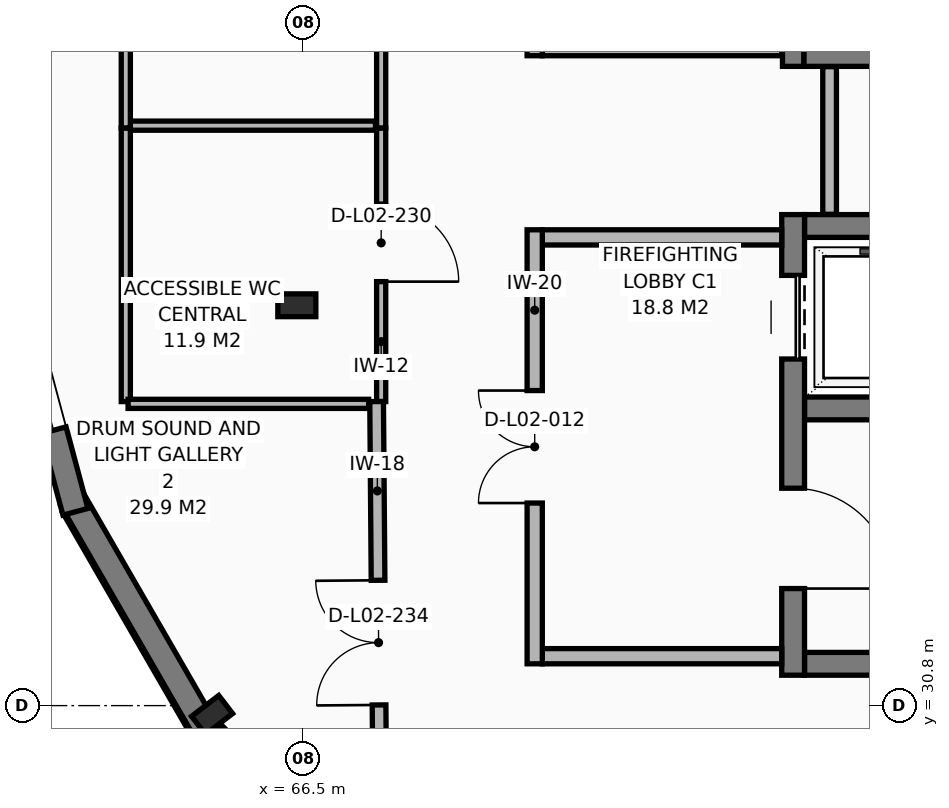
"""IFC4 building model, lengths in metres.
Left out: names, types, materials, properties, quantities, classifications, styles, units other than length and angle.
Written with IfcOpenShell. Run it as: python <this file> out.ifc"""

import sys

from ifc_helpers import new_model, si_unit, direction, frame, frame_2d, origin, origin_2d, place, context, subcontext, project, spatial, rectangle, i_section, extrude, element, fill, save


model = new_model("IFC4")
c1 = context("Model", 3, precision=1e-05, world=origin(), true_north=direction((0.0, 1.0)))
c2 = subcontext(c1, "Body", "Model", "MODEL_VIEW")
j1 = project(units=[si_unit("LENGTHUNIT", "METRE"), si_unit("PLANEANGLEUNIT", "RADIAN")], contexts=[c1])
p1 = place(None, origin())
s1 = spatial("IfcSite", under=j1, at=p1, CompositionType="ELEMENT")
p2 = place(p1, origin())
s2 = spatial("IfcBuilding", under=s1, at=p2, CompositionType="ELEMENT")
p3 = place(p2, frame((0.0, 0.0, 9.52)))
s3 = spatial("IfcBuildingStorey", under=s2, at=p3, CompositionType="ELEMENT", Elevation=9.52)
p4 = place(p3, frame((65.305, 30.677, 0.0), z_axis=(0.0, 0.0, 1.0), x_axis=(-0.793353340291, -0.608761429009, 0.0)))
e1 = element("IfcColumn", 1, at=p4, inside=s3, PredefinedType="COLUMN", context=c2, shape_type="SweptSolid", body=[
    extrude(i_section(OverallWidth=0.3, OverallDepth=0.45, WebThickness=0.014, FlangeThickness=0.026, FilletRadius=0.027, at=origin_2d()), origin(), (0.0, 0.0, 1.0), 4.16),
])
p5 = place(p3, frame((66.42, 36.067, 0.0), z_axis=(0.0, 0.0, 1.0), x_axis=(1.0, 0.0, 0.0)))
e2 = element("IfcColumn", 2, at=p5, inside=s3, PredefinedType="COLUMN", context=c2, shape_type="SweptSolid", body=[
    extrude(i_section(OverallWidth=0.3, OverallDepth=0.5, WebThickness=0.014, FlangeThickness=0.028, FilletRadius=0.027, at=origin_2d()), origin(), (0.0, 0.0, 1.0), 4.16),
])
p6 = place(p3, frame((67.689, 28.043, 0.0), z_axis=(0.0, 0.0, 1.0), x_axis=(-0.707106781187, 0.707106781187, 0.0)))
e3 = element("IfcWall", 3, at=p6, inside=s3, PredefinedType="SOLIDWALL", context=c2, shape_type="SweptSolid", body=[
    extrude(rectangle(XDim=3.571, YDim=0.34, at=frame_2d((1.786, 0.0))), origin(), (0.0, 0.0, 1.0), 3.96),
])
p7 = place(p6, frame((1.111, 0.0, 0.85)))
e4 = element("IfcOpeningElement", 4, at=p7, cuts=e3, PredefinedType="OPENING", context=c2, shape_type="SweptSolid", body=[
    extrude(rectangle(XDim=1.35, YDim=1.5, at=frame_2d((0.675, 0.75))), frame((0.0, 0.18, 0.0), z_axis=(0.0, -1.0, 0.0), x_axis=(1.0, 0.0, 0.0)), (0.0, 0.0, 1.0), 0.36),
])
p8 = place(p3, frame((65.249, 30.421, 0.0), z_axis=(0.0, 0.0, 1.0), x_axis=(-0.500006500783, 0.866021650523, 0.0)))
e5 = element("IfcWall", 5, at=p8, inside=s3, PredefinedType="SOLIDWALL", context=c2, shape_type="SweptSolid", body=[
    extrude(rectangle(XDim=3.571, YDim=0.34, at=frame_2d((1.786, 0.0))), origin(), (0.0, 0.0, 1.0), 3.96),
])
p9 = place(p3, frame((63.507, 33.35, 0.0), z_axis=(0.0, 0.0, 1.0), x_axis=(-0.258764562387, 0.965940423242, 0.0)))
e6 = element("IfcWall", 6, at=p9, inside=s3, PredefinedType="SOLIDWALL", context=c2, shape_type="SweptSolid", body=[
    extrude(rectangle(XDim=3.571, YDim=0.34, at=frame_2d((1.786, 0.0))), origin(), (0.0, 0.0, 1.0), 3.96),
])
p10 = place(p9, frame((1.111, 0.0, 0.85)))
e7 = element("IfcOpeningElement", 7, at=p10, cuts=e6, PredefinedType="OPENING", context=c2, shape_type="SweptSolid", body=[
    extrude(rectangle(XDim=1.35, YDim=1.5, at=frame_2d((0.675, 0.75))), frame((0.0, 0.18, 0.0), z_axis=(0.0, -1.0, 0.0), x_axis=(1.0, 0.0, 0.0)), (0.0, 0.0, 1.0), 0.36),
])
for number, where, z_axis, x_axis in (
    (8, (73.1, 31.35, 0.0), (0.0, 0.0, 1.0), (1.0, 0.0, 0.0)),
    (9, (80.8, 34.71, 0.0), (0.0, 0.0, 1.0), (-1.0, 0.0, 0.0)),
):
    element("IfcWall", number, at=place(p3, frame(where, z_axis=z_axis, x_axis=x_axis)), inside=s3, PredefinedType="SHEAR", context=c2, shape_type="SweptSolid", body=[
        extrude(rectangle(XDim=7.7, YDim=0.3, at=frame_2d((3.85, 0.0))), origin(), (0.0, 0.0, 1.0), 3.96),
    ])
p11 = place(p3, frame((76.3, 37.11, 0.0), z_axis=(0.0, 0.0, 1.0), x_axis=(-1.0, 0.0, 0.0)))
e10 = element("IfcWall", 10, at=p11, inside=s3, PredefinedType="SHEAR", context=c2, shape_type="SweptSolid", body=[
    extrude(rectangle(XDim=3.2, YDim=0.3, at=frame_2d((1.6, 0.0))), origin(), (0.0, 0.0, 1.0), 3.96),
])
p12 = place(p3, frame((72.95, 37.26, 0.0), z_axis=(0.0, 0.0, 1.0), x_axis=(0.0, -1.0, 0.0)))
e11 = element("IfcWall", 11, at=p12, inside=s3, PredefinedType="SHEAR", context=c2, shape_type="SweptSolid", body=[
    extrude(rectangle(XDim=6.06, YDim=0.3, at=frame_2d((3.03, 0.0))), origin(), (0.0, 0.0, 1.0), 3.96),
])
p13 = place(p12, frame((0.8, 0.0, 0.0)))
e12 = element("IfcOpeningElement", 12, at=p13, cuts=e11, PredefinedType="OPENING", context=c2, shape_type="SweptSolid", body=[
    extrude(rectangle(XDim=1.1, YDim=2.12, at=frame_2d((0.55, 1.06))), frame((0.0, 0.16, 0.0), z_axis=(0.0, -1.0, 0.0), x_axis=(1.0, 0.0, 0.0)), (0.0, 0.0, 1.0), 0.32),
])
p14 = place(p12, frame((3.6, 0.0, 0.0)))
e13 = element("IfcOpeningElement", 13, at=p14, cuts=e11, PredefinedType="OPENING", context=c2, shape_type="SweptSolid", body=[
    extrude(rectangle(XDim=1.32, YDim=2.12, at=frame_2d((0.66, 1.06))), frame((0.0, 0.16, 0.0), z_axis=(0.0, -1.0, 0.0), x_axis=(1.0, 0.0, 0.0)), (0.0, 0.0, 1.0), 0.32),
])
p15 = place(p3, frame((69.65, 31.45, 0.0), z_axis=(0.0, 0.0, 1.0), x_axis=(1.0, 0.0, 0.0)))
e14 = element("IfcWall", 14, at=p15, inside=s3, PredefinedType="PARTITIONING", context=c2, shape_type="SweptSolid", body=[
    extrude(rectangle(XDim=3.15, YDim=0.2, at=frame_2d((1.575, 0.0))), origin(), (0.0, 0.0, 1.0), 3.35),
])
p16 = place(p3, frame((72.8, 36.96, 0.0), z_axis=(0.0, 0.0, 1.0), x_axis=(-1.0, 0.0, 0.0)))
e15 = element("IfcWall", 15, at=p16, inside=s3, PredefinedType="PARTITIONING", context=c2, shape_type="SweptSolid", body=[
    extrude(rectangle(XDim=3.15, YDim=0.2, at=frame_2d((1.575, 0.0))), origin(), (0.0, 0.0, 1.0), 3.96),
])
p17 = place(p3, frame((69.55, 31.35, 0.0), z_axis=(0.0, 0.0, 1.0), x_axis=(0.0, 1.0, 0.0)))
e16 = element("IfcWall", 16, at=p17, inside=s3, PredefinedType="PARTITIONING", context=c2, shape_type="SweptSolid", body=[
    extrude(rectangle(XDim=5.71, YDim=0.2, at=frame_2d((2.855, 0.0))), origin(), (0.0, 0.0, 1.0), 3.35),
])
p18 = place(p17, frame((2.115, 0.0, 0.0)))
e17 = element("IfcOpeningElement", 17, at=p18, cuts=e16, PredefinedType="OPENING", context=c2, shape_type="SweptSolid", body=[
    extrude(rectangle(XDim=1.48, YDim=2.15, at=frame_2d((0.74, 1.075))), frame((0.0, 0.11, 0.0), z_axis=(0.0, -1.0, 0.0), x_axis=(1.0, 0.0, 0.0)), (0.0, 0.0, 1.0), 0.22),
])
p19 = place(p3, frame((73.09, 39.35, 0.0), z_axis=(0.0, 0.0, 1.0), x_axis=(1.0, 0.0, 0.0)))
e18 = element("IfcWall", 18, at=p19, inside=s3, PredefinedType="SHEAR", context=c2, shape_type="SweptSolid", body=[
    extrude(rectangle(XDim=7.7, YDim=0.28, at=frame_2d((3.85, 0.0))), origin(), (0.0, 0.0, 1.0), 3.96),
])
p20 = place(p3, frame((72.95, 45.25, 0.0), z_axis=(0.0, 0.0, 1.0), x_axis=(0.0, -1.0, 0.0)))
e19 = element("IfcWall", 19, at=p20, inside=s3, PredefinedType="SHEAR", context=c2, shape_type="SweptSolid", body=[
    extrude(rectangle(XDim=6.04, YDim=0.28, at=frame_2d((3.02, 0.0))), origin(), (0.0, 0.0, 1.0), 3.96),
])
p21 = place(p20, frame((0.8, 0.0, 0.0)))
e20 = element("IfcOpeningElement", 20, at=p21, cuts=e19, PredefinedType="OPENING", context=c2, shape_type="SweptSolid", body=[
    extrude(rectangle(XDim=1.1, YDim=2.12, at=frame_2d((0.55, 1.06))), frame((0.0, 0.15, 0.0), z_axis=(0.0, -1.0, 0.0), x_axis=(1.0, 0.0, 0.0)), (0.0, 0.0, 1.0), 0.3),
])
p22 = place(p20, frame((3.6, 0.0, 0.0)))
e21 = element("IfcOpeningElement", 21, at=p22, cuts=e19, PredefinedType="OPENING", context=c2, shape_type="SweptSolid", body=[
    extrude(rectangle(XDim=1.32, YDim=2.12, at=frame_2d((0.66, 1.06))), frame((0.0, 0.15, 0.0), z_axis=(0.0, -1.0, 0.0), x_axis=(1.0, 0.0, 0.0)), (0.0, 0.0, 1.0), 0.3),
])
p23 = place(p3, frame((69.65, 39.45, 0.0), z_axis=(0.0, 0.0, 1.0), x_axis=(1.0, 0.0, 0.0)))
e22 = element("IfcWall", 22, at=p23, inside=s3, PredefinedType="PARTITIONING", context=c2, shape_type="SweptSolid", body=[
    extrude(rectangle(XDim=3.15, YDim=0.2, at=frame_2d((1.575, 0.0))), origin(), (0.0, 0.0, 1.0), 3.96),
])
p24 = place(p3, frame((69.55, 39.35, 0.0), z_axis=(0.0, 0.0, 1.0), x_axis=(0.0, 1.0, 0.0)))
e23 = element("IfcWall", 23, at=p24, inside=s3, PredefinedType="PARTITIONING", context=c2, shape_type="SweptSolid", body=[
    extrude(rectangle(XDim=5.71, YDim=0.2, at=frame_2d((2.855, 0.0))), origin(), (0.0, 0.0, 1.0), 3.35),
])
p25 = place(p24, frame((2.115, 0.0, 0.0)))
e24 = element("IfcOpeningElement", 24, at=p25, cuts=e23, PredefinedType="OPENING", context=c2, shape_type="SweptSolid", body=[
    extrude(rectangle(XDim=1.48, YDim=2.15, at=frame_2d((0.74, 1.075))), frame((0.0, 0.11, 0.0), z_axis=(0.0, -1.0, 0.0), x_axis=(1.0, 0.0, 0.0)), (0.0, 0.0, 1.0), 0.22),
])
p26 = place(p3, frame((67.53, 38.4, 0.0), z_axis=(0.0, 0.0, 1.0), x_axis=(0.0, -1.0, 0.0)))
e25 = element("IfcWall", 25, at=p26, inside=s3, PredefinedType="PARTITIONING", context=c2, shape_type="SweptSolid", body=[
    extrude(rectangle(XDim=3.6, YDim=0.12, at=frame_2d((1.8, 0.0))), origin(), (0.0, 0.0, 1.0), 3.35),
])
p27 = place(p26, frame((1.002, 0.0, 0.0)))
e26 = element("IfcOpeningElement", 26, at=p27, cuts=e25, PredefinedType="OPENING", context=c2, shape_type="SweptSolid", body=[
    extrude(rectangle(XDim=1.02, YDim=2.12, at=frame_2d((0.51, 1.06))), frame((0.0, 0.07, 0.0), z_axis=(0.0, -1.0, 0.0), x_axis=(1.0, 0.0, 0.0)), (0.0, 0.0, 1.0), 0.14),
])
p28 = place(p3, frame((67.53, 42.0, 0.0), z_axis=(0.0, 0.0, 1.0), x_axis=(0.0, -1.0, 0.0)))
e27 = element("IfcWall", 27, at=p28, inside=s3, PredefinedType="PARTITIONING", context=c2, shape_type="SweptSolid", body=[
    extrude(rectangle(XDim=3.6, YDim=0.12, at=frame_2d((1.8, 0.0))), origin(), (0.0, 0.0, 1.0), 3.35),
])
p29 = place(p28, frame((1.32, 0.0, 0.0)))
e28 = element("IfcOpeningElement", 28, at=p29, cuts=e27, PredefinedType="OPENING", context=c2, shape_type="SweptSolid", body=[
    extrude(rectangle(XDim=0.96, YDim=2.1, at=frame_2d((0.48, 1.05))), frame((0.0, 0.07, 0.0), z_axis=(0.0, -1.0, 0.0), x_axis=(1.0, 0.0, 0.0)), (0.0, 0.0, 1.0), 0.14),
])
p30 = place(p3, frame((73.43, 39.206, 0.0), z_axis=(0.0, 0.0, 1.0), x_axis=(0.0, -1.0, 0.0)))
e29 = element("IfcWall", 29, at=p30, inside=s3, PredefinedType="PARTITIONING", context=c2, shape_type="SweptSolid", body=[
    extrude(rectangle(XDim=1.942, YDim=0.18, at=frame_2d((0.971, 0.0))), origin(), (0.0, 0.0, 1.0), 3.95),
])
p31 = place(p3, frame((67.521, 28.458, 0.0), z_axis=(0.0, 0.0, 1.0), x_axis=(-0.008044699063, 0.999967640885, 0.0)))
e30 = element("IfcWall", 30, at=p31, inside=s3, PredefinedType="PARTITIONING", context=c2, shape_type="SweptSolid", body=[
    extrude(rectangle(XDim=6.343, YDim=0.18, at=frame_2d((3.171, 0.0))), origin(), (0.0, 0.0, 1.0), 3.35),
])
p32 = place(p31, frame((2.351, 0.0, 0.0)))
e31 = element("IfcOpeningElement", 31, at=p32, cuts=e30, PredefinedType="OPENING", context=c2, shape_type="SweptSolid", body=[
    extrude(rectangle(XDim=1.64, YDim=2.2, at=frame_2d((0.82, 1.1))), frame((0.0, 0.1, 0.0), z_axis=(0.0, -1.0, 0.0), x_axis=(1.0, 0.0, 0.0)), (0.0, 0.0, 1.0), 0.2),
])
p33 = place(p3, frame((64.2, 38.43, 0.0), z_axis=(0.0, 0.0, 1.0), x_axis=(1.0, 0.0, 0.0)))
e32 = element("IfcWall", 32, at=p33, inside=s3, PredefinedType="PARTITIONING", context=c2, shape_type="SweptSolid", body=[
    extrude(rectangle(XDim=3.255, YDim=0.12, at=frame_2d((1.627, 0.0))), origin(), (0.0, 0.0, 1.0), 3.35),
])
p34 = place(p3, frame((64.17, 34.8, 0.0), z_axis=(0.0, 0.0, 1.0), x_axis=(0.0, 1.0, 0.0)))
e33 = element("IfcWall", 33, at=p34, inside=s3, PredefinedType="PARTITIONING", context=c2, shape_type="SweptSolid", body=[
    extrude(rectangle(XDim=3.6, YDim=0.12, at=frame_2d((1.8, 0.0))), origin(), (0.0, 0.0, 1.0), 3.5),
])
p35 = place(p3, frame((67.365, 34.77, 0.0), z_axis=(0.0, 0.0, 1.0), x_axis=(-1.0, 0.0, 0.0)))
e34 = element("IfcWall", 34, at=p35, inside=s3, PredefinedType="PARTITIONING", context=c2, shape_type="SweptSolid", body=[
    extrude(rectangle(XDim=3.165, YDim=0.12, at=frame_2d((1.583, 0.0))), origin(), (0.0, 0.0, 1.0), 3.35),
])
p36 = place(p3, frame((64.17, 38.4, 0.0), z_axis=(0.0, 0.0, 1.0), x_axis=(0.0, 1.0, 0.0)))
e35 = element("IfcWall", 35, at=p36, inside=s3, PredefinedType="PARTITIONING", context=c2, shape_type="SweptSolid", body=[
    extrude(rectangle(XDim=3.6, YDim=0.12, at=frame_2d((1.8, 0.0))), origin(), (0.0, 0.0, 1.0), 3.95),
])
p37 = place(p10, origin())
e36 = element("IfcWindow", 36, at=p37, inside=s3, PartitioningType="SINGLE_PANEL", PredefinedType="WINDOW", context=c2, shape_type="SweptSolid", body=[
    extrude(rectangle(XDim=1.35, YDim=1.5, at=frame_2d((0.675, 0.75))), frame((0.0, 0.03, 0.0), z_axis=(0.0, -1.0, 0.0), x_axis=(1.0, 0.0, 0.0)), (0.0, 0.0, 1.0), 0.06),
])
fill(e7, e36)
p38 = place(p13, origin())
e37 = element("IfcDoor", 37, at=p38, inside=s3, OperationType="SLIDING_TO_LEFT", PredefinedType="DOOR", context=c2, shape_type="SweptSolid", body=[
    extrude(rectangle(XDim=1.1, YDim=2.12, at=frame_2d((0.55, 1.06))), frame((0.0, 0.025, 0.0), z_axis=(0.0, -1.0, 0.0), x_axis=(1.0, 0.0, 0.0)), (0.0, 0.0, 1.0), 0.05),
])
fill(e12, e37)
p39 = place(p14, origin())
e38 = element("IfcDoor", 38, at=p39, inside=s3, OperationType="SINGLE_SWING_RIGHT", PredefinedType="DOOR", context=c2, shape_type="SweptSolid", body=[
    extrude(rectangle(XDim=1.32, YDim=2.12, at=frame_2d((0.66, 1.06))), frame((0.0, 0.025, 0.0), z_axis=(0.0, -1.0, 0.0), x_axis=(1.0, 0.0, 0.0)), (0.0, 0.0, 1.0), 0.05),
])
fill(e13, e38)
p40 = place(p18, origin())
e39 = element("IfcDoor", 39, at=p40, inside=s3, OperationType="DOUBLE_DOOR_SINGLE_SWING", PredefinedType="DOOR", context=c2, shape_type="SweptSolid", body=[
    extrude(rectangle(XDim=1.48, YDim=2.15, at=frame_2d((0.74, 1.075))), frame((0.0, 0.025, 0.0), z_axis=(0.0, -1.0, 0.0), x_axis=(1.0, 0.0, 0.0)), (0.0, 0.0, 1.0), 0.05),
])
fill(e17, e39)
p41 = place(p27, origin())
e40 = element("IfcDoor", 40, at=p41, inside=s3, OperationType="SINGLE_SWING_RIGHT", PredefinedType="DOOR", context=c2, shape_type="SweptSolid", body=[
    extrude(rectangle(XDim=1.02, YDim=2.12, at=frame_2d((0.51, 1.06))), frame((0.0, 0.025, 0.0), z_axis=(0.0, -1.0, 0.0), x_axis=(1.0, 0.0, 0.0)), (0.0, 0.0, 1.0), 0.05),
])
fill(e26, e40)
p42 = place(p32, origin())
e41 = element("IfcDoor", 41, at=p42, inside=s3, OperationType="DOUBLE_DOOR_SINGLE_SWING", PredefinedType="DOOR", context=c2, shape_type="SweptSolid", body=[
    extrude(rectangle(XDim=1.64, YDim=2.2, at=frame_2d((0.82, 1.1))), frame((0.0, 0.025, 0.0), z_axis=(0.0, -1.0, 0.0), x_axis=(1.0, 0.0, 0.0)), (0.0, 0.0, 1.0), 0.05),
])
fill(e31, e41)
save(model, sys.argv[1])
